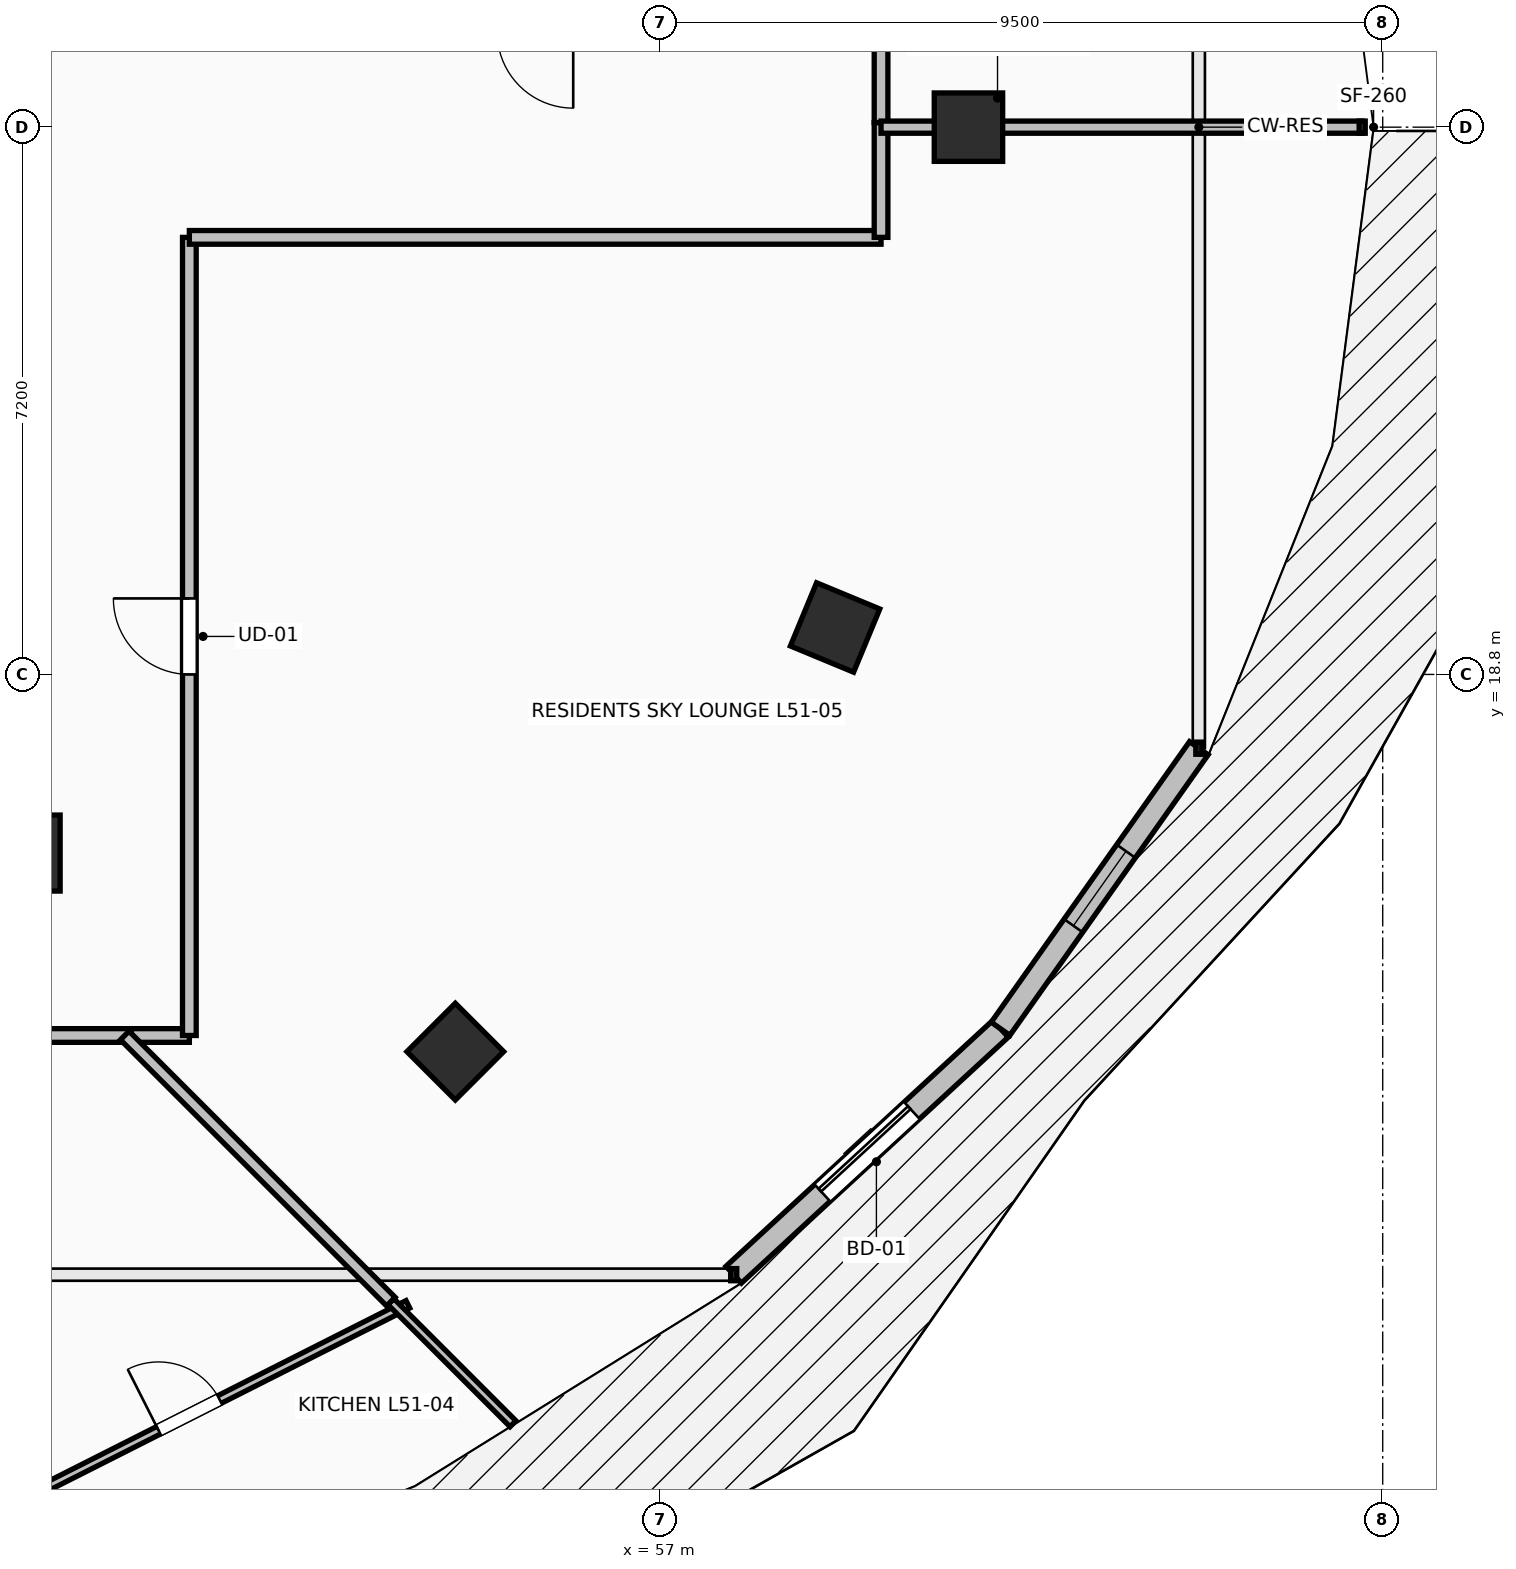
"""IFC4 building model, lengths in metres.
Left out: names, types, materials, properties, quantities, classifications, styles, units other than length and angle.
Written with IfcOpenShell. Run it as: python <this file> out.ifc"""

import sys

from ifc_helpers import new_model, si_unit, direction, frame, frame_2d, origin, origin_2d, place, context, subcontext, project, spatial, rectangle, extrude, element, fill, save


model = new_model("IFC4")
c1 = context("Model", 3, precision=1e-05, world=origin(), true_north=direction((0.0, 1.0)))
c2 = subcontext(c1, "Body", "Model", "MODEL_VIEW")
j1 = project(units=[si_unit("LENGTHUNIT", "METRE"), si_unit("PLANEANGLEUNIT", "RADIAN")], contexts=[c1])
p1 = place(None, origin())
s1 = spatial("IfcSite", under=j1, at=p1, CompositionType="ELEMENT")
p2 = place(p1, origin())
s2 = spatial("IfcBuilding", under=s1, at=p2, CompositionType="ELEMENT")
p3 = place(p2, frame((0.0, 0.0, 189.6)))
s3 = spatial("IfcBuildingStorey", under=s2, at=p3, CompositionType="ELEMENT", Elevation=189.6)
for number, where, z_axis, x_axis in (
    (1, (61.05, 26.0, 0.0), (0.0, 0.0, 1.0), (1.0, 0.0, 0.0)),
    (2, (54.299, 13.838, 0.0), (0.0, 0.0, 1.0), (0.707, -0.707, 0.0)),
    (3, (59.295, 19.418, 0.0), (0.0, 0.0, 1.0), (0.924, -0.383, 0.0)),
):
    element("IfcColumn", number, at=place(p3, frame(where, z_axis=z_axis, x_axis=x_axis)), inside=s3, PredefinedType="COLUMN", context=c2, shape_type="SweptSolid", body=[
        extrude(rectangle(XDim=0.9, YDim=0.9, at=origin_2d()), origin(), (0.0, 0.0, 1.0), 3.5),
    ])
p4 = place(p3, frame((48.75, 16.45, 0.0), z_axis=(0.0, 0.0, 1.0), x_axis=(1.0, 0.0, 0.0)))
e4 = element("IfcColumn", 4, at=p4, inside=s3, PredefinedType="PILASTER", context=c2, shape_type="SweptSolid", body=[
    extrude(rectangle(XDim=0.7, YDim=1.0, at=origin_2d()), origin(), (0.0, 0.0, 1.0), 3.5),
])
p5 = place(p3, frame((57.962, 10.903, 0.0), z_axis=(0.0, 0.0, 1.0), x_axis=(0.735359993374, 0.677676678177, 0.0)))
e5 = element("IfcWall", 5, at=p5, inside=s3, PredefinedType="STANDARD", context=c2, shape_type="SweptSolid", body=[
    extrude(rectangle(XDim=4.774, YDim=0.3, at=frame_2d((2.387, 0.0))), origin(), (0.0, 0.0, 1.0), 3.24),
])
p6 = place(p5, frame((1.587, 0.0, 0.0)))
e6 = element("IfcOpeningElement", 6, at=p6, cuts=e5, PredefinedType="OPENING", context=c2, shape_type="SweptSolid", body=[
    extrude(rectangle(XDim=1.6, YDim=2.3, at=frame_2d((0.8, 1.15))), frame((0.0, 0.165, 0.0), z_axis=(0.0, -1.0, 0.0), x_axis=(1.0, 0.0, 0.0)), (0.0, 0.0, 1.0), 0.33),
])
p7 = place(p3, frame((61.472, 14.139, 0.0), z_axis=(0.0, 0.0, 1.0), x_axis=(0.577168747264, 0.81662490605, 0.0)))
e7 = element("IfcWall", 7, at=p7, inside=s3, PredefinedType="STANDARD", context=c2, shape_type="SweptSolid", body=[
    extrude(rectangle(XDim=4.52, YDim=0.3, at=frame_2d((2.26, 0.0))), origin(), (0.0, 0.0, 1.0), 3.24),
])
p8 = place(p7, frame((1.66, 0.0, 0.85)))
e8 = element("IfcOpeningElement", 8, at=p8, cuts=e7, PredefinedType="OPENING", context=c2, shape_type="SweptSolid", body=[
    extrude(rectangle(XDim=1.2, YDim=2.1, at=frame_2d((0.6, 1.05))), frame((0.0, 0.165, 0.0), z_axis=(0.0, -1.0, 0.0), x_axis=(1.0, 0.0, 0.0)), (0.0, 0.0, 1.0), 0.33),
])
p9 = place(p3, frame((42.242, 14.05, 0.0), z_axis=(0.0, 0.0, 1.0), x_axis=(1.0, 0.0, 0.0)))
e9 = element("IfcWall", 9, at=p9, inside=s3, PredefinedType="PARTITIONING", context=c2, shape_type="SweptSolid", body=[
    extrude(rectangle(XDim=7.793, YDim=0.18, at=frame_2d((3.896, 0.0))), origin(), (0.0, 0.0, 1.0), 2.432),
])
p10 = place(p9, frame((3.396, 0.0, 0.0)))
e10 = element("IfcOpeningElement", 10, at=p10, cuts=e9, PredefinedType="OPENING", context=c2, shape_type="SweptSolid", body=[
    extrude(rectangle(XDim=1.0, YDim=2.15, at=frame_2d((0.5, 1.075))), frame((0.0, 0.105, 0.0), z_axis=(0.0, -1.0, 0.0), x_axis=(1.0, 0.0, 0.0)), (0.0, 0.0, 1.0), 0.21),
])
p11 = place(p3, frame((50.035, 14.05, 0.0), z_axis=(0.0, 0.0, 1.0), x_axis=(1.0, 0.0, 0.0)))
e11 = element("IfcWall", 11, at=p11, inside=s3, PredefinedType="PARTITIONING", context=c2, shape_type="SweptSolid", body=[
    extrude(rectangle(XDim=0.765, YDim=0.18, at=frame_2d((0.383, 0.0))), origin(), (0.0, 0.0, 1.0), 2.922),
])
p12 = place(p3, frame((50.8, 14.05, 0.0), z_axis=(0.0, 0.0, 1.0), x_axis=(0.0, 1.0, 0.0)))
e12 = element("IfcWall", 12, at=p12, inside=s3, PredefinedType="PARTITIONING", context=c2, shape_type="SweptSolid", body=[
    extrude(rectangle(XDim=10.5, YDim=0.18, at=frame_2d((5.25, 0.0))), origin(), (0.0, 0.0, 1.0), 2.432),
])
p13 = place(p12, frame((4.75, 0.0, 0.0)))
e13 = element("IfcOpeningElement", 13, at=p13, cuts=e12, PredefinedType="OPENING", context=c2, shape_type="SweptSolid", body=[
    extrude(rectangle(XDim=1.0, YDim=2.15, at=frame_2d((0.5, 1.075))), frame((0.0, 0.105, 0.0), z_axis=(0.0, -1.0, 0.0), x_axis=(1.0, 0.0, 0.0)), (0.0, 0.0, 1.0), 0.21),
])
p14 = place(p3, frame((50.8, 24.55, 0.0), z_axis=(0.0, 0.0, 1.0), x_axis=(1.0, 0.0, 0.0)))
e14 = element("IfcWall", 14, at=p14, inside=s3, PredefinedType="PARTITIONING", context=c2, shape_type="SweptSolid", body=[
    extrude(rectangle(XDim=9.1, YDim=0.18, at=frame_2d((4.55, 0.0))), origin(), (0.0, 0.0, 1.0), 2.432),
])
p15 = place(p3, frame((59.9, 24.55, 0.0), z_axis=(0.0, 0.0, 1.0), x_axis=(0.0, 1.0, 0.0)))
e15 = element("IfcWall", 15, at=p15, inside=s3, PredefinedType="PARTITIONING", context=c2, shape_type="SweptSolid", body=[
    extrude(rectangle(XDim=1.51, YDim=0.18, at=frame_2d((0.755, 0.0))), origin(), (0.0, 0.0, 1.0), 2.432),
])
p16 = place(p3, frame((59.9, 26.06, 0.0), z_axis=(0.0, 0.0, 1.0), x_axis=(0.0, 1.0, 0.0)))
e16 = element("IfcWall", 16, at=p16, inside=s3, PredefinedType="PARTITIONING", context=c2, shape_type="SweptSolid", body=[
    extrude(rectangle(XDim=1.19, YDim=0.18, at=frame_2d((0.595, 0.0))), origin(), (0.0, 0.0, 1.0), 2.432),
])
p17 = place(p3, frame((47.917, 7.604, 0.0), z_axis=(0.0, 0.0, 1.0), x_axis=(0.892549884102, 0.450948671569, 0.0)))
e17 = element("IfcWall", 17, at=p17, inside=s3, PredefinedType="PARTITIONING", context=c2, shape_type="SweptSolid", body=[
    extrude(rectangle(XDim=6.451, YDim=0.11, at=frame_2d((3.226, 0.0))), origin(), (0.0, 0.0, 1.0), 3.24),
])
p18 = place(p17, frame((2.776, 0.0, 0.0)))
e18 = element("IfcOpeningElement", 18, at=p18, cuts=e17, PredefinedType="OPENING", context=c2, shape_type="SweptSolid", body=[
    extrude(rectangle(XDim=0.9, YDim=2.1, at=frame_2d((0.45, 1.05))), frame((0.0, 0.07, 0.0), z_axis=(0.0, -1.0, 0.0), x_axis=(1.0, 0.0, 0.0)), (0.0, 0.0, 1.0), 0.14),
])
p19 = place(p3, frame((53.451, 10.549, 0.0), z_axis=(0.0, 0.0, 1.0), x_axis=(0.707106781187, -0.707106781187, 0.0)))
e19 = element("IfcWall", 19, at=p19, inside=s3, PredefinedType="PARTITIONING", context=c2, shape_type="SweptSolid", body=[
    extrude(rectangle(XDim=2.273, YDim=0.11, at=frame_2d((1.136, 0.0))), origin(), (0.0, 0.0, 1.0), 3.24),
])
p20 = place(p3, frame((53.451, 10.549, 0.0), z_axis=(0.0, 0.0, 1.0), x_axis=(-0.707106781187, 0.707106781187, 0.0)))
e20 = element("IfcWall", 20, at=p20, inside=s3, PredefinedType="PARTITIONING", context=c2, shape_type="SweptSolid", body=[
    extrude(rectangle(XDim=4.951, YDim=0.16, at=frame_2d((2.476, 0.0))), origin(), (0.0, 0.0, 1.0), 2.774),
])
p21 = place(p3, frame((66.229, 26.0, 0.0), z_axis=(0.0, 0.0, 1.0), x_axis=(-1.0, 0.0, 0.0)))
e21 = element("IfcWall", 21, at=p21, inside=s3, PredefinedType="PARTITIONING", context=c2, shape_type="SweptSolid", body=[
    extrude(rectangle(XDim=6.329, YDim=0.16, at=frame_2d((3.165, 0.0))), origin(), (0.0, 0.0, 1.0), 2.432),
])
p22 = place(p6, origin())
e22 = element("IfcDoor", 22, at=p22, inside=s3, OperationType="SLIDING_TO_LEFT", PredefinedType="DOOR", context=c2, shape_type="SweptSolid", body=[
    extrude(rectangle(XDim=1.6, YDim=2.3, at=frame_2d((0.8, 1.15))), frame((0.0, 0.025, 0.0), z_axis=(0.0, -1.0, 0.0), x_axis=(1.0, 0.0, 0.0)), (0.0, 0.0, 1.0), 0.05),
])
fill(e6, e22)
p23 = place(p8, origin())
e23 = element("IfcWindow", 23, at=p23, inside=s3, PartitioningType="SINGLE_PANEL", PredefinedType="WINDOW", context=c2, shape_type="SweptSolid", body=[
    extrude(rectangle(XDim=1.2, YDim=2.1, at=frame_2d((0.6, 1.05))), frame((0.0, 0.03, 0.0), z_axis=(0.0, -1.0, 0.0), x_axis=(1.0, 0.0, 0.0)), (0.0, 0.0, 1.0), 0.06),
])
fill(e8, e23)
p24 = place(p13, origin())
e24 = element("IfcDoor", 24, at=p24, inside=s3, OperationType="SINGLE_SWING_RIGHT", PredefinedType="DOOR", context=c2, shape_type="SweptSolid", body=[
    extrude(rectangle(XDim=1.0, YDim=2.15, at=frame_2d((0.5, 1.075))), frame((0.0, 0.025, 0.0), z_axis=(0.0, -1.0, 0.0), x_axis=(1.0, 0.0, 0.0)), (0.0, 0.0, 1.0), 0.05),
])
fill(e13, e24)
p25 = place(p18, origin())
e25 = element("IfcDoor", 25, at=p25, inside=s3, OperationType="SINGLE_SWING_LEFT", PredefinedType="DOOR", context=c2, shape_type="SweptSolid", body=[
    extrude(rectangle(XDim=0.9, YDim=2.1, at=frame_2d((0.45, 1.05))), frame((0.0, 0.025, 0.0), z_axis=(0.0, -1.0, 0.0), x_axis=(1.0, 0.0, 0.0)), (0.0, 0.0, 1.0), 0.05),
])
fill(e18, e25)
save(model, sys.argv[1])
